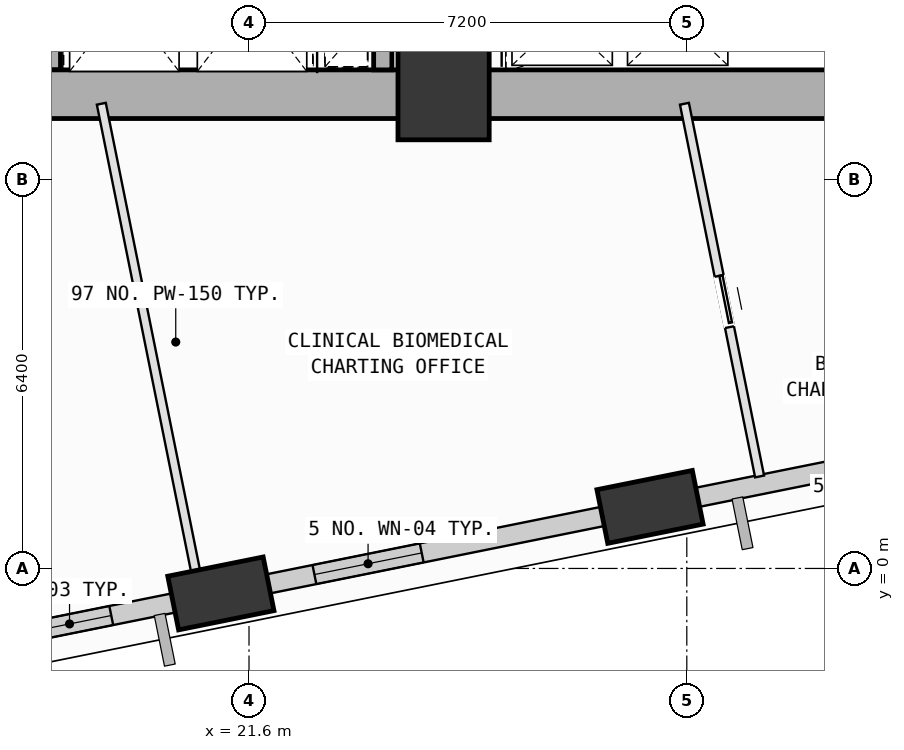
"""IFC4 building model, lengths in metres.
Left out: names, types, materials, properties, quantities, classifications, styles, units other than length and angle.
Written with IfcOpenShell. Run it as: python <this file> out.ifc"""

import sys

from ifc_helpers import new_model, si_unit, direction, frame, frame_2d, origin, origin_2d, place, context, subcontext, project, spatial, rectangle, extrude, element, fill, save


model = new_model("IFC4")
c1 = context("Model", 3, precision=1e-05, world=origin(), true_north=direction((0.0, 1.0)))
c2 = subcontext(c1, "Body", "Model", "MODEL_VIEW")
j1 = project(units=[si_unit("LENGTHUNIT", "METRE"), si_unit("PLANEANGLEUNIT", "RADIAN")], contexts=[c1])
p1 = place(None, origin())
s1 = spatial("IfcSite", under=j1, at=p1, CompositionType="ELEMENT")
p2 = place(p1, origin())
s2 = spatial("IfcBuilding", under=s1, at=p2, CompositionType="ELEMENT")
p3 = place(p2, frame((0.0, 0.0, 71.0)))
s3 = spatial("IfcBuildingStorey", under=s2, at=p3, CompositionType="ELEMENT", Elevation=71.0)
p4 = place(p3, frame((24.8, 7.8, 0.0), z_axis=(0.0, 0.0, 1.0), x_axis=(1.0, 0.0, 0.0)))
e1 = element("IfcColumn", 1, at=p4, inside=s3, PredefinedType="COLUMN", context=c2, shape_type="SweptSolid", body=[
    extrude(rectangle(XDim=1.5, YDim=1.5, at=origin_2d()), origin(), (0.0, 0.0, 1.0), 4.0),
])
p5 = place(p3, frame((21.137, -0.411, 0.002), z_axis=(0.104182069546, -0.05042242271, 0.993279253621), x_axis=(0.250328918616, 0.967890520267, 0.022877353029)))
e2 = element("IfcColumn", 2, at=p5, inside=s3, PredefinedType="COLUMN", context=c2, shape_type="SweptSolid", body=[
    extrude(rectangle(XDim=1.6, YDim=0.9, at=origin_2d()), origin(), (0.0, 0.0, 1.0), 4.024),
])
p6 = place(p3, frame((28.195, 1.012, 0.002), z_axis=(0.098277099799, -0.021515209232, 0.994926483428), x_axis=(0.017535010044, 0.999648488455, 0.019885244574)))
e3 = element("IfcColumn", 3, at=p6, inside=s3, PredefinedType="COLUMN", context=c2, shape_type="SweptSolid", body=[
    extrude(rectangle(XDim=1.6, YDim=0.9, at=origin_2d()), origin(), (0.0, 0.0, 1.0), 4.017),
])
p7 = place(p3, frame((20.74, -0.491, 0.0), z_axis=(0.0, 0.0, 1.0), x_axis=(-0.98027449332, -0.197640880757, 0.0)))
e4 = element("IfcWall", 4, at=p7, inside=s3, PredefinedType="SOLIDWALL", context=c2, shape_type="SweptSolid", body=[
    extrude(rectangle(XDim=6.034, YDim=0.32, at=frame_2d((3.017, 0.0))), origin(), (0.0, 0.0, 1.0), 3.165),
])
p8 = place(p7, frame((1.433, 0.0, 0.75)))
e5 = element("IfcOpeningElement", 5, at=p8, cuts=e4, PredefinedType="OPENING", context=c2, shape_type="SweptSolid", body=[
    extrude(rectangle(XDim=1.4, YDim=1.85, at=frame_2d((0.7, 0.925))), frame((0.0, 0.17, 0.0), z_axis=(0.0, -1.0, 0.0), x_axis=(1.0, 0.0, 0.0)), (0.0, 0.0, 1.0), 0.34),
])
p9 = place(p3, frame((27.786, 0.93, 0.0), z_axis=(0.0, 0.0, 1.0), x_axis=(-0.980274615863, -0.197640272956, 0.0)))
e6 = element("IfcWall", 6, at=p9, inside=s3, PredefinedType="SOLIDWALL", context=c2, shape_type="SweptSolid", body=[
    extrude(rectangle(XDim=6.006, YDim=0.32, at=frame_2d((3.003, 0.0))), origin(), (0.0, 0.0, 1.0), 3.165),
])
p10 = place(p9, frame((3.413, 0.0, 0.75)))
e7 = element("IfcOpeningElement", 7, at=p10, cuts=e6, PredefinedType="OPENING", context=c2, shape_type="SweptSolid", body=[
    extrude(rectangle(XDim=1.8, YDim=2.05, at=frame_2d((0.9, 1.025))), frame((0.0, 0.17, 0.0), z_axis=(0.0, -1.0, 0.0), x_axis=(1.0, 0.0, 0.0)), (0.0, 0.0, 1.0), 0.34),
])
p11 = place(p3, frame((34.839, 2.352, 0.0), z_axis=(0.0, 0.0, 1.0), x_axis=(-0.980280090352, -0.197613118135, 0.0)))
e8 = element("IfcWall", 8, at=p11, inside=s3, PredefinedType="SOLIDWALL", context=c2, shape_type="SweptSolid", body=[
    extrude(rectangle(XDim=5.99, YDim=0.32, at=frame_2d((2.995, 0.0))), origin(), (0.0, 0.0, 1.0), 3.165),
])
p12 = place(p11, frame((1.882, 0.0, 0.75)))
e9 = element("IfcOpeningElement", 9, at=p12, cuts=e8, PredefinedType="OPENING", context=c2, shape_type="SweptSolid", body=[
    extrude(rectangle(XDim=1.2, YDim=1.75, at=frame_2d((0.6, 0.875))), frame((0.0, 0.17, 0.0), z_axis=(0.0, -1.0, 0.0), x_axis=(1.0, 0.0, 0.0)), (0.0, 0.0, 1.0), 0.34),
])
p13 = place(p3, frame((18.38, 15.12, 0.0), z_axis=(0.0, 0.0, 1.0), x_axis=(0.0, -1.0, 0.0)))
e10 = element("IfcWall", 10, at=p13, inside=s3, PredefinedType="SOLIDWALL", context=c2, shape_type="SweptSolid", body=[
    extrude(rectangle(XDim=6.92, YDim=0.24, at=frame_2d((3.46, 0.0))), origin(), (0.0, 0.0, 1.0), 3.78),
])
for number, where, z_axis, x_axis in (
    (11, (14.0, 7.8, 0.0), (0.0, 0.0, 1.0), (1.0, 0.0, 0.0)),
    (12, (24.8, 7.8, 0.0), (0.0, 0.0, 1.0), (1.0, 0.0, 0.0)),
):
    element("IfcWall", number, at=place(p3, frame(where, z_axis=z_axis, x_axis=x_axis)), inside=s3, PredefinedType="SHEAR", context=c2, shape_type="SweptSolid", body=[
        extrude(rectangle(XDim=10.8, YDim=0.8, at=frame_2d((5.4, 0.0))), origin(), (0.0, 0.0, 1.0), 3.78),
    ])
p14 = place(p3, frame((23.8, 8.2, 0.0), z_axis=(0.0, 0.0, 1.0), x_axis=(0.0, 1.0, 0.0)))
e13 = element("IfcWall", 13, at=p14, inside=s3, PredefinedType="SOLIDWALL", context=c2, shape_type="SweptSolid", body=[
    extrude(rectangle(XDim=2.48, YDim=0.3, at=frame_2d((1.24, 0.0))), origin(), (0.0, 0.0, 1.0), 3.78),
])
p15 = place(p3, frame((19.171, 7.643, 0.0), z_axis=(0.0, 0.0, 1.0), x_axis=(0.197713770803, -0.980259794562, 0.0)))
e14 = element("IfcWall", 14, at=p15, inside=s3, PredefinedType="PARTITIONING", context=c2, shape_type="SweptSolid", body=[
    extrude(rectangle(XDim=8.168, YDim=0.15, at=frame_2d((4.084, 0.0))), origin(), (0.0, 0.0, 1.0), 3.78),
])
p16 = place(p3, frame((21.944, -0.483, 0.0), z_axis=(0.0, 0.0, 1.0), x_axis=(-0.980303483452, -0.197497038791, 0.0)))
e15 = element("IfcWall", 15, at=p16, inside=s3, PredefinedType="PARTITIONING", context=c2, shape_type="SweptSolid", body=[
    extrude(rectangle(XDim=0.952, YDim=0.15, at=frame_2d((0.476, 0.0))), origin(), (0.0, 0.0, 1.0), 3.165),
])
p17 = place(p3, frame((29.013, 0.943, 0.0), z_axis=(0.0, 0.0, 1.0), x_axis=(-0.980283356785, -0.197596913968, 0.0)))
e16 = element("IfcWall", 16, at=p17, inside=s3, PredefinedType="PARTITIONING", context=c2, shape_type="SweptSolid", body=[
    extrude(rectangle(XDim=1.205, YDim=0.15, at=frame_2d((0.602, 0.0))), origin(), (0.0, 0.0, 1.0), 3.165),
])
p18 = place(p3, frame((28.761, 7.643, 0.0), z_axis=(0.0, 0.0, 1.0), x_axis=(0.197662499127, -0.980270134422, 0.0)))
e17 = element("IfcWall", 17, at=p18, inside=s3, PredefinedType="PARTITIONING", context=c2, shape_type="SweptSolid", body=[
    extrude(rectangle(XDim=6.253, YDim=0.15, at=frame_2d((3.127, 0.0))), origin(), (0.0, 0.0, 1.0), 3.78),
])
p19 = place(p18, frame((2.888, 0.0, 0.0)))
e18 = element("IfcOpeningElement", 18, at=p19, cuts=e17, PredefinedType="OPENING", context=c2, shape_type="SweptSolid", body=[
    extrude(rectangle(XDim=0.86, YDim=2.06, at=frame_2d((0.43, 1.03))), frame((0.0, 0.085, 0.0), z_axis=(0.0, -1.0, 0.0), x_axis=(1.0, 0.0, 0.0)), (0.0, 0.0, 1.0), 0.17),
])
p20 = place(p8, origin())
e19 = element("IfcWindow", 19, at=p20, inside=s3, PartitioningType="SINGLE_PANEL", PredefinedType="WINDOW", context=c2, shape_type="SweptSolid", body=[
    extrude(rectangle(XDim=1.4, YDim=1.85, at=frame_2d((0.7, 0.925))), frame((0.0, 0.03, 0.0), z_axis=(0.0, -1.0, 0.0), x_axis=(1.0, 0.0, 0.0)), (0.0, 0.0, 1.0), 0.06),
])
fill(e5, e19)
p21 = place(p10, origin())
e20 = element("IfcWindow", 20, at=p21, inside=s3, PartitioningType="SINGLE_PANEL", PredefinedType="WINDOW", context=c2, shape_type="SweptSolid", body=[
    extrude(rectangle(XDim=1.8, YDim=2.05, at=frame_2d((0.9, 1.025))), frame((0.0, 0.03, 0.0), z_axis=(0.0, -1.0, 0.0), x_axis=(1.0, 0.0, 0.0)), (0.0, 0.0, 1.0), 0.06),
])
fill(e7, e20)
p22 = place(p19, origin())
e21 = element("IfcDoor", 21, at=p22, inside=s3, OperationType="SLIDING_TO_LEFT", PredefinedType="DOOR", context=c2, shape_type="SweptSolid", body=[
    extrude(rectangle(XDim=0.86, YDim=2.06, at=frame_2d((0.43, 1.03))), frame((0.0, 0.025, 0.0), z_axis=(0.0, -1.0, 0.0), x_axis=(1.0, 0.0, 0.0)), (0.0, 0.0, 1.0), 0.05),
])
fill(e18, e21)
save(model, sys.argv[1])
